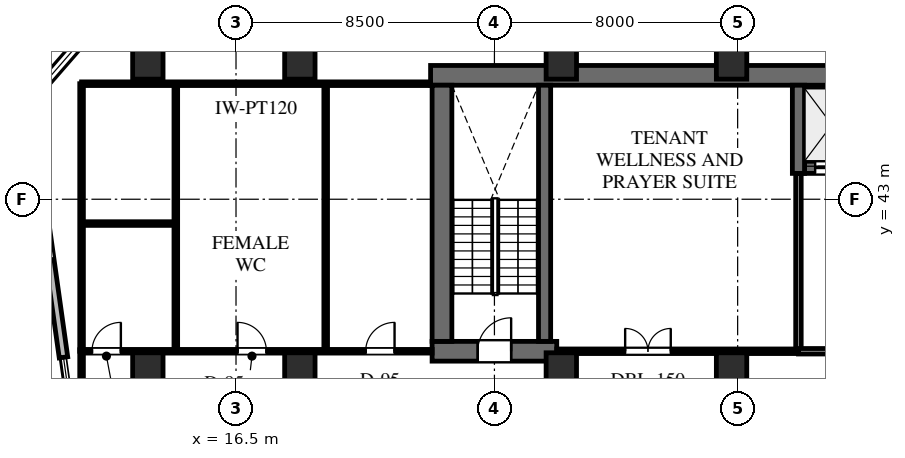
"""IFC4 building model, lengths in metres.
Left out: names, types, materials, properties, quantities, classifications, styles, units other than length and angle.
Written with IfcOpenShell. Run it as: python <this file> out.ifc"""

import sys

from ifc_helpers import new_model, si_unit, direction, frame, frame_2d, origin, origin_2d, place, context, subcontext, project, spatial, rectangle, extrude, element, fill, save


model = new_model("IFC4")
c1 = context("Model", 3, precision=1e-05, world=origin(), true_north=direction((0.0, 1.0)))
c2 = subcontext(c1, "Body", "Model", "MODEL_VIEW")
j1 = project(units=[si_unit("LENGTHUNIT", "METRE"), si_unit("PLANEANGLEUNIT", "RADIAN")], contexts=[c1])
p1 = place(None, origin())
s1 = spatial("IfcSite", under=j1, at=p1, CompositionType="ELEMENT")
p2 = place(p1, origin())
s2 = spatial("IfcBuilding", under=s1, at=p2, CompositionType="ELEMENT")
p3 = place(p2, frame((0.0, 0.0, 112.0)))
s3 = spatial("IfcBuildingStorey", under=s2, at=p3, CompositionType="ELEMENT", Elevation=112.0)
p4 = place(p3, frame((22.9, 47.075, 0.0), z_axis=(0.0, 0.0, 1.0), x_axis=(1.0, 0.0, 0.0)))
e1 = element("IfcWall", 1, at=p4, inside=s3, PredefinedType="SHEAR", context=c2, shape_type="SweptSolid", body=[
    extrude(rectangle(XDim=43.6, YDim=0.65, at=frame_2d((21.8, 0.0))), origin(), (0.0, 0.0, 1.0), 4.0),
])
p5 = place(p3, frame((35.2, 44.05, 0.0), z_axis=(0.0, 0.0, 1.0), x_axis=(1.0, 0.0, 0.0)))
e2 = element("IfcWall", 2, at=p5, inside=s3, PredefinedType="SHEAR", context=c2, shape_type="SweptSolid", body=[
    extrude(rectangle(XDim=9.65, YDim=0.4, at=frame_2d((4.825, 0.0))), origin(), (0.0, 0.0, 1.0), 4.0),
])
p6 = place(p5, frame((0.35, 0.0, 0.0)))
e3 = element("IfcOpeningElement", 3, at=p6, cuts=e2, PredefinedType="OPENING", context=c2, shape_type="SweptSolid", body=[
    extrude(rectangle(XDim=1.1, YDim=2.2, at=frame_2d((0.55, 1.1))), frame((0.0, 0.21, 0.0), z_axis=(0.0, -1.0, 0.0), x_axis=(1.0, 0.0, 0.0)), (0.0, 0.0, 1.0), 0.42),
])
p7 = place(p5, frame((2.35, 0.0, 0.0)))
e4 = element("IfcOpeningElement", 4, at=p7, cuts=e2, PredefinedType="OPENING", context=c2, shape_type="SweptSolid", body=[
    extrude(rectangle(XDim=1.1, YDim=2.2, at=frame_2d((0.55, 1.1))), frame((0.0, 0.21, 0.0), z_axis=(0.0, -1.0, 0.0), x_axis=(1.0, 0.0, 0.0)), (0.0, 0.0, 1.0), 0.42),
])
p8 = place(p5, frame((4.35, 0.0, 0.0)))
e5 = element("IfcOpeningElement", 5, at=p8, cuts=e2, PredefinedType="OPENING", context=c2, shape_type="SweptSolid", body=[
    extrude(rectangle(XDim=1.1, YDim=2.2, at=frame_2d((0.55, 1.1))), frame((0.0, 0.21, 0.0), z_axis=(0.0, -1.0, 0.0), x_axis=(1.0, 0.0, 0.0)), (0.0, 0.0, 1.0), 0.42),
])
p9 = place(p5, frame((6.35, 0.0, 0.0)))
e6 = element("IfcOpeningElement", 6, at=p9, cuts=e2, PredefinedType="OPENING", context=c2, shape_type="SweptSolid", body=[
    extrude(rectangle(XDim=1.1, YDim=2.2, at=frame_2d((0.55, 1.1))), frame((0.0, 0.21, 0.0), z_axis=(0.0, -1.0, 0.0), x_axis=(1.0, 0.0, 0.0)), (0.0, 0.0, 1.0), 0.42),
])
p10 = place(p3, frame((35.0, 43.85, 0.0), z_axis=(0.0, 0.0, 1.0), x_axis=(0.0, 1.0, 0.0)))
e7 = element("IfcWall", 7, at=p10, inside=s3, PredefinedType="SHEAR", context=c2, shape_type="SweptSolid", body=[
    extrude(rectangle(XDim=2.9, YDim=0.4, at=frame_2d((1.45, 0.0))), origin(), (0.0, 0.0, 1.0), 4.0),
])
p11 = place(p3, frame((22.95, 38.0, 0.0), z_axis=(0.0, 0.0, 1.0), x_axis=(1.0, 0.0, 0.0)))
e8 = element("IfcWall", 8, at=p11, inside=s3, PredefinedType="SHEAR", context=c2, shape_type="SweptSolid", body=[
    extrude(rectangle(XDim=4.1, YDim=0.65, at=frame_2d((2.05, 0.0))), origin(), (0.0, 0.0, 1.0), 4.0),
])
p12 = place(p11, frame((1.5, 0.0, 0.0)))
e9 = element("IfcOpeningElement", 9, at=p12, cuts=e8, PredefinedType="OPENING", context=c2, shape_type="SweptSolid", body=[
    extrude(rectangle(XDim=1.1, YDim=2.2, at=frame_2d((0.55, 1.1))), frame((0.0, 0.335, 0.0), z_axis=(0.0, -1.0, 0.0), x_axis=(1.0, 0.0, 0.0)), (0.0, 0.0, 1.0), 0.67),
])
p13 = place(p3, frame((23.275, 38.325, 0.0), z_axis=(0.0, 0.0, 1.0), x_axis=(0.0, 1.0, 0.0)))
e10 = element("IfcWall", 10, at=p13, inside=s3, PredefinedType="SHEAR", context=c2, shape_type="SweptSolid", body=[
    extrude(rectangle(XDim=8.425, YDim=0.65, at=frame_2d((4.212, 0.0))), origin(), (0.0, 0.0, 1.0), 4.0),
])
p14 = place(p3, frame((26.65, 38.325, 0.0), z_axis=(0.0, 0.0, 1.0), x_axis=(0.0, 1.0, 0.0)))
e11 = element("IfcWall", 11, at=p14, inside=s3, PredefinedType="SHEAR", context=c2, shape_type="SweptSolid", body=[
    extrude(rectangle(XDim=8.425, YDim=0.4, at=frame_2d((4.212, 0.0))), origin(), (0.0, 0.0, 1.0), 4.0),
])
for number, where, z_axis, x_axis in (
    (12, (32.8, 37.35, 0.0), (0.0, 0.0, 1.0), (1.0, 0.0, 0.0)),
    (13, (32.8, 47.55, 0.0), (0.0, 0.0, 1.0), (1.0, 0.0, 0.0)),
    (14, (27.2, 37.35, 0.0), (0.0, 0.0, 1.0), (1.0, 0.0, 0.0)),
    (15, (27.2, 47.55, 0.0), (0.0, 0.0, 1.0), (1.0, 0.0, 0.0)),
    (16, (18.6, 37.35, 0.0), (0.0, 0.0, 1.0), (1.0, 0.0, 0.0)),
    (17, (18.6, 47.55, 0.0), (0.0, 0.0, 1.0), (1.0, 0.0, 0.0)),
    (18, (13.6, 37.35, 0.0), (0.0, 0.0, 1.0), (1.0, 0.0, 0.0)),
    (19, (13.6, 47.55, 0.0), (0.0, 0.0, 1.0), (1.0, 0.0, 0.0)),
):
    element("IfcColumn", number, at=place(p3, frame(where, z_axis=z_axis, x_axis=x_axis)), inside=s3, PredefinedType="COLUMN", context=c2, shape_type="SweptSolid", body=[
        extrude(rectangle(XDim=1.0, YDim=1.2, at=origin_2d()), origin(), (0.0, 0.0, 1.0), 4.0),
    ])
p15 = place(p3, frame((10.825, 37.8, 0.0), z_axis=(0.0, 0.0, 1.0), x_axis=(-0.139180610108, 0.990267013371, 0.0)))
e20 = element("IfcWall", 20, at=p15, inside=s3, PredefinedType="STANDARD", context=c2, shape_type="SweptSolid", body=[
    extrude(rectangle(XDim=8.467, YDim=0.28, at=frame_2d((4.234, 0.0))), origin(), (0.0, 0.0, 1.0), 3.75),
])
p16 = place(p15, frame((3.273, 0.0, 0.65)))
e21 = element("IfcOpeningElement", 21, at=p16, cuts=e20, PredefinedType="OPENING", context=c2, shape_type="SweptSolid", body=[
    extrude(rectangle(XDim=1.8, YDim=2.1, at=frame_2d((0.9, 1.05))), frame((0.0, 0.15, 0.0), z_axis=(0.0, -1.0, 0.0), x_axis=(1.0, 0.0, 0.0)), (0.0, 0.0, 1.0), 0.3),
])
p17 = place(p3, frame((9.646, 46.185, 0.0), z_axis=(0.0, 0.0, 1.0), x_axis=(0.656070644076, 0.754699483226, 0.0)))
e22 = element("IfcWall", 22, at=p17, inside=s3, PredefinedType="STANDARD", context=c2, shape_type="SweptSolid", body=[
    extrude(rectangle(XDim=2.908, YDim=0.28, at=frame_2d((1.454, 0.0))), origin(), (0.0, 0.0, 1.0), 3.75),
])
p18 = place(p17, frame((0.541, 0.0, 0.65)))
e23 = element("IfcOpeningElement", 23, at=p18, cuts=e22, PredefinedType="OPENING", context=c2, shape_type="SweptSolid", body=[
    extrude(rectangle(XDim=1.8, YDim=2.1, at=frame_2d((0.9, 1.05))), frame((0.0, 0.15, 0.0), z_axis=(0.0, -1.0, 0.0), x_axis=(1.0, 0.0, 0.0)), (0.0, 0.0, 1.0), 0.3),
])
p19 = place(p3, frame((27.05, 38.0, 0.0), z_axis=(0.0, 0.0, 1.0), x_axis=(1.0, 0.0, 0.0)))
e24 = element("IfcWall", 24, at=p19, inside=s3, PredefinedType="PARTITIONING", context=c2, shape_type="SweptSolid", body=[
    extrude(rectangle(XDim=7.95, YDim=0.15, at=frame_2d((3.975, 0.0))), origin(), (0.0, 0.0, 1.0), 2.894),
])
p20 = place(p19, frame((2.25, 0.0, 0.0)))
e25 = element("IfcOpeningElement", 25, at=p20, cuts=e24, PredefinedType="OPENING", context=c2, shape_type="SweptSolid", body=[
    extrude(rectangle(XDim=1.5, YDim=2.2, at=frame_2d((0.75, 1.1))), frame((0.0, 0.085, 0.0), z_axis=(0.0, -1.0, 0.0), x_axis=(1.0, 0.0, 0.0)), (0.0, 0.0, 1.0), 0.17),
])
p21 = place(p3, frame((35.0, 38.0, 0.0), z_axis=(0.0, 0.0, 1.0), x_axis=(0.0, 1.0, 0.0)))
e26 = element("IfcWall", 26, at=p21, inside=s3, PredefinedType="STANDARD", context=c2, shape_type="SweptSolid", body=[
    extrude(rectangle(XDim=5.85, YDim=0.18, at=frame_2d((2.925, 0.0))), origin(), (0.0, 0.0, 1.0), 3.75),
])
p22 = place(p3, frame((35.0, 38.0, 0.0), z_axis=(0.0, 0.0, 1.0), x_axis=(1.0, 0.0, 0.0)))
e27 = element("IfcWall", 27, at=p22, inside=s3, PredefinedType="STANDARD", context=c2, shape_type="SweptSolid", body=[
    extrude(rectangle(XDim=10.05, YDim=0.18, at=frame_2d((5.025, 0.0))), origin(), (0.0, 0.0, 1.0), 2.894),
])
p23 = place(p22, frame((5.858, 0.0, 0.0)))
e28 = element("IfcOpeningElement", 28, at=p23, cuts=e27, PredefinedType="OPENING", context=c2, shape_type="SweptSolid", body=[
    extrude(rectangle(XDim=1.8, YDim=2.2, at=frame_2d((0.9, 1.1))), frame((0.0, 0.1, 0.0), z_axis=(0.0, -1.0, 0.0), x_axis=(1.0, 0.0, 0.0)), (0.0, 0.0, 1.0), 0.2),
])
p24 = place(p3, frame((11.42, 38.0, 0.0), z_axis=(0.0, 0.0, 1.0), x_axis=(1.0, 0.0, 0.0)))
e29 = element("IfcWall", 29, at=p24, inside=s3, PredefinedType="PARTITIONING", context=c2, shape_type="SweptSolid", body=[
    extrude(rectangle(XDim=11.53, YDim=0.12, at=frame_2d((5.765, 0.0))), origin(), (0.0, 0.0, 1.0), 2.894),
])
p25 = place(p24, frame((0.343, 0.0, 0.0)))
e30 = element("IfcOpeningElement", 30, at=p25, cuts=e29, PredefinedType="OPENING", context=c2, shape_type="SweptSolid", body=[
    extrude(rectangle(XDim=0.95, YDim=2.15, at=frame_2d((0.475, 1.075))), frame((0.0, 0.07, 0.0), z_axis=(0.0, -1.0, 0.0), x_axis=(1.0, 0.0, 0.0)), (0.0, 0.0, 1.0), 0.14),
])
p26 = place(p24, frame((5.13, 0.0, 0.0)))
e31 = element("IfcOpeningElement", 31, at=p26, cuts=e29, PredefinedType="OPENING", context=c2, shape_type="SweptSolid", body=[
    extrude(rectangle(XDim=0.95, YDim=2.15, at=frame_2d((0.475, 1.075))), frame((0.0, 0.07, 0.0), z_axis=(0.0, -1.0, 0.0), x_axis=(1.0, 0.0, 0.0)), (0.0, 0.0, 1.0), 0.14),
])
p27 = place(p24, frame((9.345, 0.0, 0.0)))
e32 = element("IfcOpeningElement", 32, at=p27, cuts=e29, PredefinedType="OPENING", context=c2, shape_type="SweptSolid", body=[
    extrude(rectangle(XDim=0.95, YDim=2.15, at=frame_2d((0.475, 1.075))), frame((0.0, 0.07, 0.0), z_axis=(0.0, -1.0, 0.0), x_axis=(1.0, 0.0, 0.0)), (0.0, 0.0, 1.0), 0.14),
])
p28 = place(p3, frame((11.42, 38.0, 0.0), z_axis=(0.0, 0.0, 1.0), x_axis=(0.0, 1.0, 0.0)))
e33 = element("IfcWall", 33, at=p28, inside=s3, PredefinedType="PARTITIONING", context=c2, shape_type="SweptSolid", body=[
    extrude(rectangle(XDim=8.8, YDim=0.12, at=frame_2d((4.4, 0.0))), origin(), (0.0, 0.0, 1.0), 3.75),
])
p29 = place(p3, frame((11.42, 46.8, 0.0), z_axis=(0.0, 0.0, 1.0), x_axis=(1.0, 0.0, 0.0)))
e34 = element("IfcWall", 34, at=p29, inside=s3, PredefinedType="PARTITIONING", context=c2, shape_type="SweptSolid", body=[
    extrude(rectangle(XDim=11.48, YDim=0.12, at=frame_2d((5.74, 0.0))), origin(), (0.0, 0.0, 1.0), 2.894),
])
for number, where, z_axis, x_axis in (
    (35, (14.52, 38.068, 0.0), (0.0, 0.0, 1.0), (0.0, 1.0, 0.0)),
    (36, (19.45, 38.068, 0.0), (0.0, 0.0, 1.0), (0.0, 1.0, 0.0)),
):
    element("IfcWall", number, at=place(p3, frame(where, z_axis=z_axis, x_axis=x_axis)), inside=s3, PredefinedType="PARTITIONING", context=c2, shape_type="SweptSolid", body=[
        extrude(rectangle(XDim=8.664, YDim=0.12, at=frame_2d((4.332, 0.0))), origin(), (0.0, 0.0, 1.0), 3.75),
    ])
p30 = place(p3, frame((11.488, 42.2, 0.0), z_axis=(0.0, 0.0, 1.0), x_axis=(1.0, 0.0, 0.0)))
e37 = element("IfcWall", 37, at=p30, inside=s3, PredefinedType="PARTITIONING", context=c2, shape_type="SweptSolid", body=[
    extrude(rectangle(XDim=2.964, YDim=0.12, at=frame_2d((1.482, 0.0))), origin(), (0.0, 0.0, 1.0), 2.894),
])
p31 = place(p3, frame((11.42, 34.4, 0.0), z_axis=(0.0, 0.0, 1.0), x_axis=(0.0, 1.0, 0.0)))
e38 = element("IfcWall", 38, at=p31, inside=s3, PredefinedType="PARTITIONING", context=c2, shape_type="SweptSolid", body=[
    extrude(rectangle(XDim=3.65, YDim=0.12, at=frame_2d((1.825, 0.0))), origin(), (0.0, 0.0, 1.0), 3.75),
])
p32 = place(p18, origin())
e39 = element("IfcWindow", 39, at=p32, inside=s3, PartitioningType="SINGLE_PANEL", PredefinedType="WINDOW", context=c2, shape_type="SweptSolid", body=[
    extrude(rectangle(XDim=1.8, YDim=2.1, at=frame_2d((0.9, 1.05))), frame((0.0, 0.03, 0.0), z_axis=(0.0, -1.0, 0.0), x_axis=(1.0, 0.0, 0.0)), (0.0, 0.0, 1.0), 0.06),
])
fill(e23, e39)
p33 = place(p12, origin())
e40 = element("IfcDoor", 40, at=p33, inside=s3, OperationType="SINGLE_SWING_RIGHT", PredefinedType="DOOR", context=c2, shape_type="SweptSolid", body=[
    extrude(rectangle(XDim=1.1, YDim=2.2, at=frame_2d((0.55, 1.1))), frame((0.0, 0.025, 0.0), z_axis=(0.0, -1.0, 0.0), x_axis=(1.0, 0.0, 0.0)), (0.0, 0.0, 1.0), 0.05),
])
fill(e9, e40)
p34 = place(p6, origin())
e41 = element("IfcDoor", 41, at=p34, inside=s3, OperationType="DOUBLE_DOOR_SLIDING", PredefinedType="DOOR", context=c2, shape_type="SweptSolid", body=[
    extrude(rectangle(XDim=1.1, YDim=2.2, at=frame_2d((0.55, 1.1))), frame((0.0, 0.025, 0.0), z_axis=(0.0, -1.0, 0.0), x_axis=(1.0, 0.0, 0.0)), (0.0, 0.0, 1.0), 0.05),
])
fill(e3, e41)
p35 = place(p20, origin())
e42 = element("IfcDoor", 42, at=p35, inside=s3, OperationType="DOUBLE_DOOR_SINGLE_SWING", PredefinedType="DOOR", context=c2, shape_type="SweptSolid", body=[
    extrude(rectangle(XDim=1.5, YDim=2.2, at=frame_2d((0.75, 1.1))), frame((0.0, 0.025, 0.0), z_axis=(0.0, -1.0, 0.0), x_axis=(1.0, 0.0, 0.0)), (0.0, 0.0, 1.0), 0.05),
])
fill(e25, e42)
p36 = place(p25, origin())
e43 = element("IfcDoor", 43, at=p36, inside=s3, OperationType="SINGLE_SWING_RIGHT", PredefinedType="DOOR", context=c2, shape_type="SweptSolid", body=[
    extrude(rectangle(XDim=0.95, YDim=2.15, at=frame_2d((0.475, 1.075))), frame((0.0, 0.025, 0.0), z_axis=(0.0, -1.0, 0.0), x_axis=(1.0, 0.0, 0.0)), (0.0, 0.0, 1.0), 0.05),
])
fill(e30, e43)
p37 = place(p26, origin())
e44 = element("IfcDoor", 44, at=p37, inside=s3, OperationType="SINGLE_SWING_LEFT", PredefinedType="DOOR", context=c2, shape_type="SweptSolid", body=[
    extrude(rectangle(XDim=0.95, YDim=2.15, at=frame_2d((0.475, 1.075))), frame((0.0, 0.025, 0.0), z_axis=(0.0, -1.0, 0.0), x_axis=(1.0, 0.0, 0.0)), (0.0, 0.0, 1.0), 0.05),
])
fill(e31, e44)
p38 = place(p27, origin())
e45 = element("IfcDoor", 45, at=p38, inside=s3, OperationType="SINGLE_SWING_RIGHT", PredefinedType="DOOR", context=c2, shape_type="SweptSolid", body=[
    extrude(rectangle(XDim=0.95, YDim=2.15, at=frame_2d((0.475, 1.075))), frame((0.0, 0.025, 0.0), z_axis=(0.0, -1.0, 0.0), x_axis=(1.0, 0.0, 0.0)), (0.0, 0.0, 1.0), 0.05),
])
fill(e32, e45)
save(model, sys.argv[1])
